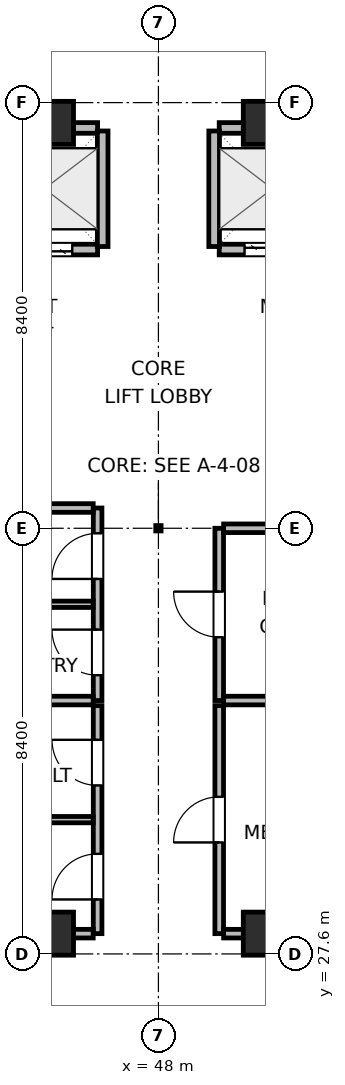
"""IFC4 building model, lengths in metres.
Left out: names, types, materials, properties, quantities, classifications, styles, units other than length and angle.
Written with IfcOpenShell. Run it as: python <this file> out.ifc"""

import sys

from ifc_helpers import new_model, si_unit, direction, frame, frame_2d, origin, origin_2d, place, context, subcontext, project, spatial, rectangle, extrude, element, fill, save


model = new_model("IFC4")
c1 = context("Model", 3, precision=1e-05, world=origin(), true_north=direction((0.0, 1.0)))
c2 = subcontext(c1, "Body", "Model", "MODEL_VIEW")
j1 = project(units=[si_unit("LENGTHUNIT", "METRE"), si_unit("PLANEANGLEUNIT", "RADIAN")], contexts=[c1])
p1 = place(None, origin())
s1 = spatial("IfcSite", under=j1, at=p1, CompositionType="ELEMENT")
p2 = place(p1, origin())
s2 = spatial("IfcBuilding", under=s1, at=p2, CompositionType="ELEMENT")
p3 = place(p2, frame((0.0, 0.0, 133.8)))
s3 = spatial("IfcBuildingStorey", under=s2, at=p3, CompositionType="ELEMENT", Elevation=133.8)
for number, where, z_axis, x_axis in (
    (1, (45.9, 28.0, 0.0), (0.0, 0.0, 1.0), (1.0, 0.0, 0.0)),
    (2, (50.1, 28.0, 0.0), (0.0, 0.0, 1.0), (1.0, 0.0, 0.0)),
    (3, (45.9, 44.0, 0.0), (0.0, 0.0, 1.0), (1.0, 0.0, 0.0)),
    (4, (50.1, 44.0, 0.0), (0.0, 0.0, 1.0), (1.0, 0.0, 0.0)),
):
    element("IfcColumn", number, at=place(p3, frame(where, z_axis=z_axis, x_axis=x_axis)), inside=s3, PredefinedType="COLUMN", context=c2, shape_type="SweptSolid", body=[
        extrude(rectangle(XDim=0.85, YDim=0.85, at=origin_2d()), origin(), (0.0, 0.0, 1.0), 3.9),
    ])
p4 = place(p3, frame((44.7, 41.5, 0.0), z_axis=(0.0, 0.0, 1.0), x_axis=(1.0, 0.0, 0.0)))
e5 = element("IfcWall", 5, at=p4, inside=s3, PredefinedType="PARTITIONING", context=c2, shape_type="SweptSolid", body=[
    extrude(rectangle(XDim=2.1, YDim=0.21, at=frame_2d((1.05, 0.0))), origin(), (0.0, 0.0, 1.0), 3.64),
])
p5 = place(p4, frame((0.5, 0.0, 0.0)))
e6 = element("IfcOpeningElement", 6, at=p5, cuts=e5, PredefinedType="OPENING", context=c2, shape_type="SweptSolid", body=[
    extrude(rectangle(XDim=1.1, YDim=2.04, at=frame_2d((0.55, 1.02))), frame((0.0, 0.115, 0.0), z_axis=(0.0, -1.0, 0.0), x_axis=(1.0, 0.0, 0.0)), (0.0, 0.0, 1.0), 0.23),
])
p6 = place(p3, frame((44.7, 43.9, 0.0), z_axis=(0.0, 0.0, 1.0), x_axis=(1.0, 0.0, 0.0)))
e7 = element("IfcWall", 7, at=p6, inside=s3, PredefinedType="PARTITIONING", context=c2, shape_type="SweptSolid", body=[
    extrude(rectangle(XDim=2.1, YDim=0.21, at=frame_2d((1.05, 0.0))), origin(), (0.0, 0.0, 1.0), 2.525),
])
p7 = place(p3, frame((46.9, 41.56, 0.0), z_axis=(0.0, 0.0, 1.0), x_axis=(0.0, 1.0, 0.0)))
e8 = element("IfcWall", 8, at=p7, inside=s3, PredefinedType="PARTITIONING", context=c2, shape_type="SweptSolid", body=[
    extrude(rectangle(XDim=2.28, YDim=0.21, at=frame_2d((1.14, 0.0))), origin(), (0.0, 0.0, 1.0), 3.64),
])
p8 = place(p3, frame((49.2, 41.5, 0.0), z_axis=(0.0, 0.0, 1.0), x_axis=(1.0, 0.0, 0.0)))
e9 = element("IfcWall", 9, at=p8, inside=s3, PredefinedType="PARTITIONING", context=c2, shape_type="SweptSolid", body=[
    extrude(rectangle(XDim=2.1, YDim=0.21, at=frame_2d((1.05, 0.0))), origin(), (0.0, 0.0, 1.0), 3.64),
])
p9 = place(p8, frame((0.5, 0.0, 0.0)))
e10 = element("IfcOpeningElement", 10, at=p9, cuts=e9, PredefinedType="OPENING", context=c2, shape_type="SweptSolid", body=[
    extrude(rectangle(XDim=1.1, YDim=2.04, at=frame_2d((0.55, 1.02))), frame((0.0, 0.115, 0.0), z_axis=(0.0, -1.0, 0.0), x_axis=(1.0, 0.0, 0.0)), (0.0, 0.0, 1.0), 0.23),
])
p10 = place(p3, frame((49.2, 43.9, 0.0), z_axis=(0.0, 0.0, 1.0), x_axis=(1.0, 0.0, 0.0)))
e11 = element("IfcWall", 11, at=p10, inside=s3, PredefinedType="PARTITIONING", context=c2, shape_type="SweptSolid", body=[
    extrude(rectangle(XDim=2.1, YDim=0.21, at=frame_2d((1.05, 0.0))), origin(), (0.0, 0.0, 1.0), 2.525),
])
p11 = place(p3, frame((49.1, 41.56, 0.0), z_axis=(0.0, 0.0, 1.0), x_axis=(0.0, 1.0, 0.0)))
e12 = element("IfcWall", 12, at=p11, inside=s3, PredefinedType="PARTITIONING", context=c2, shape_type="SweptSolid", body=[
    extrude(rectangle(XDim=2.28, YDim=0.21, at=frame_2d((1.14, 0.0))), origin(), (0.0, 0.0, 1.0), 3.64),
])
p12 = place(p3, frame((46.8, 32.6, 0.0), z_axis=(0.0, 0.0, 1.0), x_axis=(0.0, 1.0, 0.0)))
e13 = element("IfcWall", 13, at=p12, inside=s3, PredefinedType="PARTITIONING", context=c2, shape_type="SweptSolid", body=[
    extrude(rectangle(XDim=3.8, YDim=0.17, at=frame_2d((1.9, 0.0))), origin(), (0.0, 0.0, 1.0), 3.64),
])
p13 = place(p12, frame((0.5, 0.0, 0.0)))
e14 = element("IfcOpeningElement", 14, at=p13, cuts=e13, PredefinedType="OPENING", context=c2, shape_type="SweptSolid", body=[
    extrude(rectangle(XDim=0.9, YDim=2.02, at=frame_2d((0.45, 1.01))), frame((0.0, 0.095, 0.0), z_axis=(0.0, -1.0, 0.0), x_axis=(1.0, 0.0, 0.0)), (0.0, 0.0, 1.0), 0.19),
])
p14 = place(p12, frame((2.4, 0.0, 0.0)))
e15 = element("IfcOpeningElement", 15, at=p14, cuts=e13, PredefinedType="OPENING", context=c2, shape_type="SweptSolid", body=[
    extrude(rectangle(XDim=0.9, YDim=2.02, at=frame_2d((0.45, 1.01))), frame((0.0, 0.095, 0.0), z_axis=(0.0, -1.0, 0.0), x_axis=(1.0, 0.0, 0.0)), (0.0, 0.0, 1.0), 0.19),
])
for number, where, z_axis, x_axis in (
    (16, (43.8, 32.6, 0.0), (0.0, 0.0, 1.0), (1.0, 0.0, 0.0)),
    (17, (43.8, 36.4, 0.0), (0.0, 0.0, 1.0), (1.0, 0.0, 0.0)),
):
    element("IfcWall", number, at=place(p3, frame(where, z_axis=z_axis, x_axis=x_axis)), inside=s3, PredefinedType="PARTITIONING", context=c2, shape_type="SweptSolid", body=[
        extrude(rectangle(XDim=2.913, YDim=0.17, at=frame_2d((1.457, 0.0))), origin(), (0.0, 0.0, 1.0), 3.64),
    ])
p15 = place(p3, frame((43.8, 34.5, 0.0), z_axis=(0.0, 0.0, 1.0), x_axis=(1.0, 0.0, 0.0)))
e18 = element("IfcWall", 18, at=p15, inside=s3, PredefinedType="PARTITIONING", context=c2, shape_type="SweptSolid", body=[
    extrude(rectangle(XDim=2.913, YDim=0.125, at=frame_2d((1.457, 0.0))), origin(), (0.0, 0.0, 1.0), 3.64),
])
p16 = place(p3, frame((49.2, 32.6, 0.0), z_axis=(0.0, 0.0, 1.0), x_axis=(0.0, 1.0, 0.0)))
e19 = element("IfcWall", 19, at=p16, inside=s3, PredefinedType="PARTITIONING", context=c2, shape_type="SweptSolid", body=[
    extrude(rectangle(XDim=3.4, YDim=0.17, at=frame_2d((1.7, 0.0))), origin(), (0.0, 0.0, 1.0), 3.64),
])
p17 = place(p16, frame((1.25, 0.0, 0.0)))
e20 = element("IfcOpeningElement", 20, at=p17, cuts=e19, PredefinedType="OPENING", context=c2, shape_type="SweptSolid", body=[
    extrude(rectangle(XDim=0.9, YDim=2.02, at=frame_2d((0.45, 1.01))), frame((0.0, 0.095, 0.0), z_axis=(0.0, -1.0, 0.0), x_axis=(1.0, 0.0, 0.0)), (0.0, 0.0, 1.0), 0.19),
])
for number, where, z_axis, x_axis in (
    (21, (49.287, 32.6, 0.0), (0.0, 0.0, 1.0), (1.0, 0.0, 0.0)),
    (22, (49.287, 36.0, 0.0), (0.0, 0.0, 1.0), (1.0, 0.0, 0.0)),
):
    element("IfcWall", number, at=place(p3, frame(where, z_axis=z_axis, x_axis=x_axis)), inside=s3, PredefinedType="PARTITIONING", context=c2, shape_type="SweptSolid", body=[
        extrude(rectangle(XDim=2.913, YDim=0.17, at=frame_2d((1.457, 0.0))), origin(), (0.0, 0.0, 1.0), 3.64),
    ])
p18 = place(p3, frame((46.8, 28.0, 0.0), z_axis=(0.0, 0.0, 1.0), x_axis=(0.0, 1.0, 0.0)))
e23 = element("IfcWall", 23, at=p18, inside=s3, PredefinedType="PARTITIONING", context=c2, shape_type="SweptSolid", body=[
    extrude(rectangle(XDim=4.5, YDim=0.17, at=frame_2d((2.25, 0.0))), origin(), (0.0, 0.0, 1.0), 3.64),
])
p19 = place(p18, frame((0.675, 0.0, 0.0)))
e24 = element("IfcOpeningElement", 24, at=p19, cuts=e23, PredefinedType="OPENING", context=c2, shape_type="SweptSolid", body=[
    extrude(rectangle(XDim=0.9, YDim=2.02, at=frame_2d((0.45, 1.01))), frame((0.0, 0.095, 0.0), z_axis=(0.0, -1.0, 0.0), x_axis=(1.0, 0.0, 0.0)), (0.0, 0.0, 1.0), 0.19),
])
p20 = place(p18, frame((2.925, 0.0, 0.0)))
e25 = element("IfcOpeningElement", 25, at=p20, cuts=e23, PredefinedType="OPENING", context=c2, shape_type="SweptSolid", body=[
    extrude(rectangle(XDim=0.9, YDim=2.02, at=frame_2d((0.45, 1.01))), frame((0.0, 0.095, 0.0), z_axis=(0.0, -1.0, 0.0), x_axis=(1.0, 0.0, 0.0)), (0.0, 0.0, 1.0), 0.19),
])
p21 = place(p3, frame((42.5, 28.0, 0.0), z_axis=(0.0, 0.0, 1.0), x_axis=(1.0, 0.0, 0.0)))
e26 = element("IfcWall", 26, at=p21, inside=s3, PredefinedType="PARTITIONING", context=c2, shape_type="SweptSolid", body=[
    extrude(rectangle(XDim=4.213, YDim=0.17, at=frame_2d((2.106, 0.0))), origin(), (0.0, 0.0, 1.0), 2.525),
])
p22 = place(p3, frame((42.5, 30.25, 0.0), z_axis=(0.0, 0.0, 1.0), x_axis=(1.0, 0.0, 0.0)))
e27 = element("IfcWall", 27, at=p22, inside=s3, PredefinedType="PARTITIONING", context=c2, shape_type="SweptSolid", body=[
    extrude(rectangle(XDim=4.213, YDim=0.125, at=frame_2d((2.106, 0.0))), origin(), (0.0, 0.0, 1.0), 3.64),
])
p23 = place(p3, frame((49.2, 28.0, 0.0), z_axis=(0.0, 0.0, 1.0), x_axis=(0.0, 1.0, 0.0)))
e28 = element("IfcWall", 28, at=p23, inside=s3, PredefinedType="PARTITIONING", context=c2, shape_type="SweptSolid", body=[
    extrude(rectangle(XDim=4.5, YDim=0.17, at=frame_2d((2.25, 0.0))), origin(), (0.0, 0.0, 1.0), 3.64),
])
p24 = place(p23, frame((1.8, 0.0, 0.0)))
e29 = element("IfcOpeningElement", 29, at=p24, cuts=e28, PredefinedType="OPENING", context=c2, shape_type="SweptSolid", body=[
    extrude(rectangle(XDim=0.9, YDim=2.02, at=frame_2d((0.45, 1.01))), frame((0.0, 0.095, 0.0), z_axis=(0.0, -1.0, 0.0), x_axis=(1.0, 0.0, 0.0)), (0.0, 0.0, 1.0), 0.19),
])
p25 = place(p3, frame((49.287, 28.0, 0.0), z_axis=(0.0, 0.0, 1.0), x_axis=(1.0, 0.0, 0.0)))
e30 = element("IfcWall", 30, at=p25, inside=s3, PredefinedType="PARTITIONING", context=c2, shape_type="SweptSolid", body=[
    extrude(rectangle(XDim=4.213, YDim=0.17, at=frame_2d((2.106, 0.0))), origin(), (0.0, 0.0, 1.0), 2.525),
])
p26 = place(p5, origin())
e31 = element("IfcDoor", 31, at=p26, inside=s3, OperationType="DOUBLE_DOOR_SLIDING", PredefinedType="DOOR", context=c2, shape_type="SweptSolid", body=[
    extrude(rectangle(XDim=1.1, YDim=2.04, at=frame_2d((0.55, 1.02))), frame((0.0, 0.025, 0.0), z_axis=(0.0, -1.0, 0.0), x_axis=(1.0, 0.0, 0.0)), (0.0, 0.0, 1.0), 0.05),
])
fill(e6, e31)
p27 = place(p9, origin())
e32 = element("IfcDoor", 32, at=p27, inside=s3, OperationType="DOUBLE_DOOR_SLIDING", PredefinedType="DOOR", context=c2, shape_type="SweptSolid", body=[
    extrude(rectangle(XDim=1.1, YDim=2.04, at=frame_2d((0.55, 1.02))), frame((0.0, 0.025, 0.0), z_axis=(0.0, -1.0, 0.0), x_axis=(1.0, 0.0, 0.0)), (0.0, 0.0, 1.0), 0.05),
])
fill(e10, e32)
p28 = place(p13, origin())
e33 = element("IfcDoor", 33, at=p28, inside=s3, OperationType="SINGLE_SWING_RIGHT", PredefinedType="DOOR", context=c2, shape_type="SweptSolid", body=[
    extrude(rectangle(XDim=0.9, YDim=2.02, at=frame_2d((0.45, 1.01))), frame((0.0, 0.025, 0.0), z_axis=(0.0, -1.0, 0.0), x_axis=(1.0, 0.0, 0.0)), (0.0, 0.0, 1.0), 0.05),
])
fill(e14, e33)
p29 = place(p14, origin())
e34 = element("IfcDoor", 34, at=p29, inside=s3, OperationType="SINGLE_SWING_LEFT", PredefinedType="DOOR", context=c2, shape_type="SweptSolid", body=[
    extrude(rectangle(XDim=0.9, YDim=2.02, at=frame_2d((0.45, 1.01))), frame((0.0, 0.025, 0.0), z_axis=(0.0, -1.0, 0.0), x_axis=(1.0, 0.0, 0.0)), (0.0, 0.0, 1.0), 0.05),
])
fill(e15, e34)
p30 = place(p17, origin())
e35 = element("IfcDoor", 35, at=p30, inside=s3, OperationType="SINGLE_SWING_RIGHT", PredefinedType="DOOR", context=c2, shape_type="SweptSolid", body=[
    extrude(rectangle(XDim=0.9, YDim=2.02, at=frame_2d((0.45, 1.01))), frame((0.0, 0.025, 0.0), z_axis=(0.0, -1.0, 0.0), x_axis=(1.0, 0.0, 0.0)), (0.0, 0.0, 1.0), 0.05),
])
fill(e20, e35)
p31 = place(p19, origin())
e36 = element("IfcDoor", 36, at=p31, inside=s3, OperationType="SINGLE_SWING_LEFT", PredefinedType="DOOR", context=c2, shape_type="SweptSolid", body=[
    extrude(rectangle(XDim=0.9, YDim=2.02, at=frame_2d((0.45, 1.01))), frame((0.0, 0.025, 0.0), z_axis=(0.0, -1.0, 0.0), x_axis=(1.0, 0.0, 0.0)), (0.0, 0.0, 1.0), 0.05),
])
fill(e24, e36)
p32 = place(p20, origin())
e37 = element("IfcDoor", 37, at=p32, inside=s3, OperationType="SINGLE_SWING_RIGHT", PredefinedType="DOOR", context=c2, shape_type="SweptSolid", body=[
    extrude(rectangle(XDim=0.9, YDim=2.02, at=frame_2d((0.45, 1.01))), frame((0.0, 0.025, 0.0), z_axis=(0.0, -1.0, 0.0), x_axis=(1.0, 0.0, 0.0)), (0.0, 0.0, 1.0), 0.05),
])
fill(e25, e37)
p33 = place(p24, origin())
e38 = element("IfcDoor", 38, at=p33, inside=s3, OperationType="SINGLE_SWING_LEFT", PredefinedType="DOOR", context=c2, shape_type="SweptSolid", body=[
    extrude(rectangle(XDim=0.9, YDim=2.02, at=frame_2d((0.45, 1.01))), frame((0.0, 0.025, 0.0), z_axis=(0.0, -1.0, 0.0), x_axis=(1.0, 0.0, 0.0)), (0.0, 0.0, 1.0), 0.05),
])
fill(e29, e38)
save(model, sys.argv[1])
